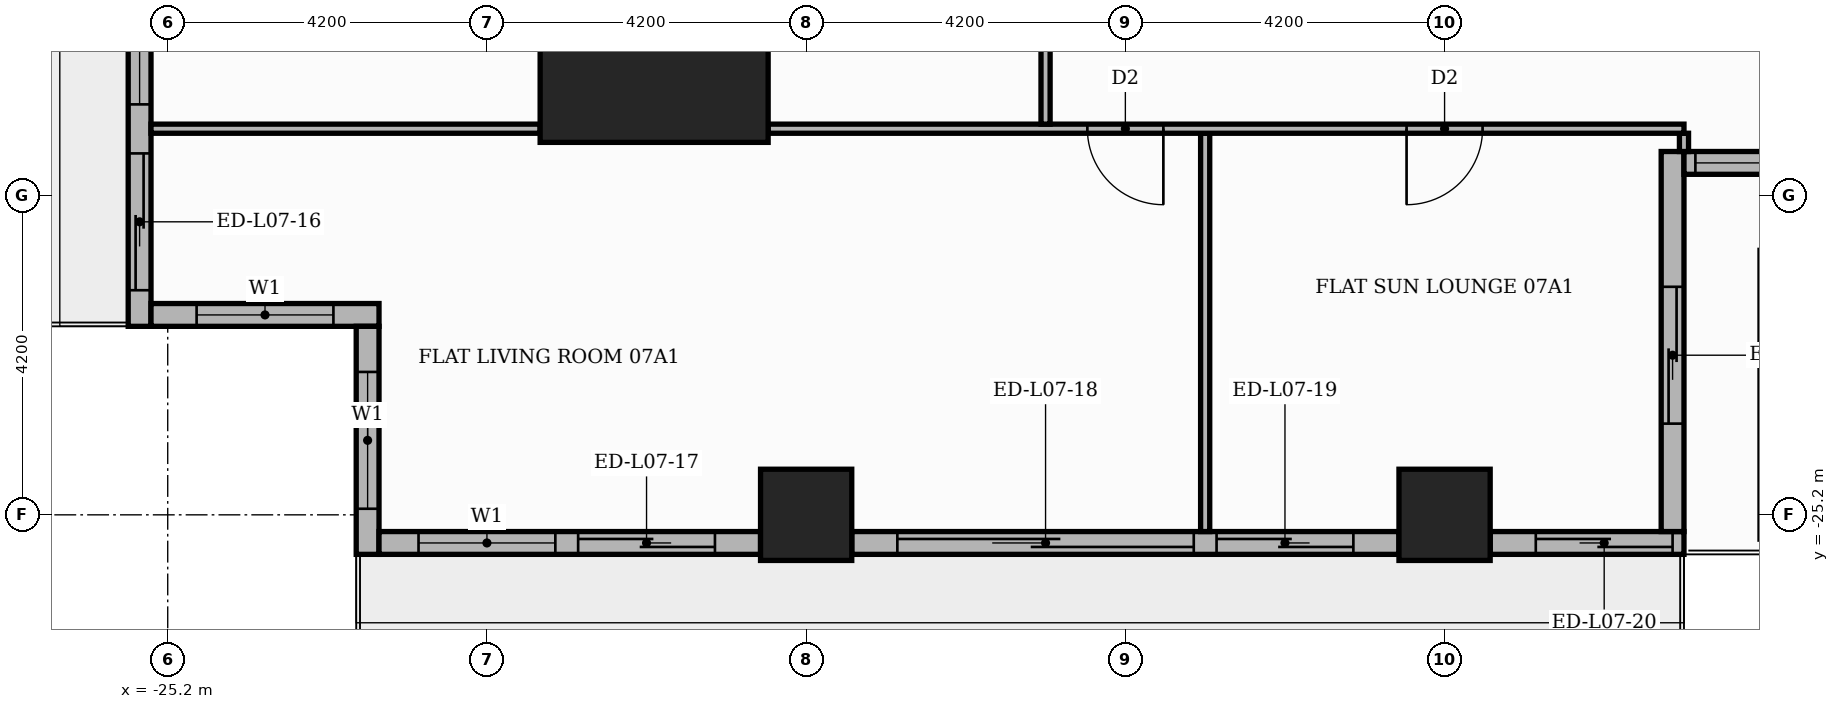
"""IFC4 building model, lengths in metres.
Left out: names, types, materials, properties, quantities, classifications, styles, units other than length and angle.
Written with IfcOpenShell. Run it as: python <this file> out.ifc"""

import sys

from ifc_helpers import new_model, si_unit, direction, frame, frame_2d, origin, origin_2d, place, context, subcontext, project, spatial, rectangle, extrude, element, fill, save


model = new_model("IFC4")
c1 = context("Model", 3, precision=1e-05, world=origin(), true_north=direction((0.0, 1.0)))
c2 = subcontext(c1, "Body", "Model", "MODEL_VIEW")
j1 = project(units=[si_unit("LENGTHUNIT", "METRE"), si_unit("PLANEANGLEUNIT", "RADIAN")], contexts=[c1])
p1 = place(None, origin())
s1 = spatial("IfcSite", under=j1, at=p1, CompositionType="ELEMENT")
p2 = place(p1, origin())
s2 = spatial("IfcBuilding", under=s1, at=p2, CompositionType="ELEMENT")
p3 = place(p2, frame((0.0, 0.0, 34.8)))
s3 = spatial("IfcBuildingStorey", under=s2, at=p3, CompositionType="ELEMENT", Elevation=34.8)
p4 = place(p3, frame((-18.8, -18.8, 0.0), z_axis=(0.0, 0.0, 1.0), x_axis=(1.0, 0.0, 0.0)))
e1 = element("IfcColumn", 1, at=p4, inside=s3, PredefinedType="COLUMN", context=c2, shape_type="SweptSolid", body=[
    extrude(rectangle(XDim=3.0, YDim=3.0, at=origin_2d()), origin(), (0.0, 0.0, 1.0), 3.9),
])
for number, where, z_axis, x_axis in (
    (2, (-8.4, -25.2, 0.0), (0.0, 0.0, 1.0), (1.0, 0.0, 0.0)),
    (3, (-16.8, -25.2, 0.0), (0.0, 0.0, 1.0), (1.0, 0.0, 0.0)),
):
    element("IfcColumn", number, at=place(p3, frame(where, z_axis=z_axis, x_axis=x_axis)), inside=s3, PredefinedType="COLUMN", context=c2, shape_type="SweptSolid", body=[
        extrude(rectangle(XDim=1.2, YDim=1.2, at=origin_2d()), origin(), (0.0, 0.0, 1.0), 3.9),
    ])
p5 = place(p3, frame((-25.57, -17.4, 0.0), z_axis=(0.0, 0.0, 1.0), x_axis=(0.0, -1.0, 0.0)))
e4 = element("IfcWall", 4, at=p5, inside=s3, PredefinedType="STANDARD", context=c2, shape_type="SweptSolid", body=[
    extrude(rectangle(XDim=5.32, YDim=0.3, at=frame_2d((2.66, 0.0))), origin(), (0.0, 0.0, 1.0), 3.48),
])
p6 = place(p5, frame((0.6, 0.0, 0.9)))
e5 = element("IfcOpeningElement", 5, at=p6, cuts=e4, PredefinedType="OPENING", context=c2, shape_type="SweptSolid", body=[
    extrude(rectangle(XDim=1.8, YDim=2.1, at=frame_2d((0.9, 1.05))), frame((0.0, 0.16, 0.0), z_axis=(0.0, -1.0, 0.0), x_axis=(1.0, 0.0, 0.0)), (0.0, 0.0, 1.0), 0.32),
])
p7 = place(p5, frame((3.045, 0.0, 0.0)))
e6 = element("IfcOpeningElement", 6, at=p7, cuts=e4, PredefinedType="OPENING", context=c2, shape_type="SweptSolid", body=[
    extrude(rectangle(XDim=1.8, YDim=2.4, at=frame_2d((0.9, 1.2))), frame((0.0, 0.16, 0.0), z_axis=(0.0, -1.0, 0.0), x_axis=(1.0, 0.0, 0.0)), (0.0, 0.0, 1.0), 0.32),
])
p8 = place(p3, frame((-25.42, -22.57, 0.0), z_axis=(0.0, 0.0, 1.0), x_axis=(1.0, 0.0, 0.0)))
e7 = element("IfcWall", 7, at=p8, inside=s3, PredefinedType="STANDARD", context=c2, shape_type="SweptSolid", body=[
    extrude(rectangle(XDim=3.0, YDim=0.3, at=frame_2d((1.5, 0.0))), origin(), (0.0, 0.0, 1.0), 3.48),
])
p9 = place(p8, frame((0.6, 0.0, 0.9)))
e8 = element("IfcOpeningElement", 8, at=p9, cuts=e7, PredefinedType="OPENING", context=c2, shape_type="SweptSolid", body=[
    extrude(rectangle(XDim=1.8, YDim=2.1, at=frame_2d((0.9, 1.05))), frame((0.0, 0.16, 0.0), z_axis=(0.0, -1.0, 0.0), x_axis=(1.0, 0.0, 0.0)), (0.0, 0.0, 1.0), 0.32),
])
p10 = place(p3, frame((-22.57, -22.72, 0.0), z_axis=(0.0, 0.0, 1.0), x_axis=(0.0, -1.0, 0.0)))
e9 = element("IfcWall", 9, at=p10, inside=s3, PredefinedType="STANDARD", context=c2, shape_type="SweptSolid", body=[
    extrude(rectangle(XDim=3.0, YDim=0.3, at=frame_2d((1.5, 0.0))), origin(), (0.0, 0.0, 1.0), 3.48),
])
p11 = place(p10, frame((0.6, 0.0, 0.9)))
e10 = element("IfcOpeningElement", 10, at=p11, cuts=e9, PredefinedType="OPENING", context=c2, shape_type="SweptSolid", body=[
    extrude(rectangle(XDim=1.8, YDim=2.1, at=frame_2d((0.9, 1.05))), frame((0.0, 0.16, 0.0), z_axis=(0.0, -1.0, 0.0), x_axis=(1.0, 0.0, 0.0)), (0.0, 0.0, 1.0), 0.32),
])
p12 = place(p3, frame((-22.42, -25.57, 0.0), z_axis=(0.0, 0.0, 1.0), x_axis=(1.0, 0.0, 0.0)))
e11 = element("IfcWall", 11, at=p12, inside=s3, PredefinedType="STANDARD", context=c2, shape_type="SweptSolid", body=[
    extrude(rectangle(XDim=5.02, YDim=0.3, at=frame_2d((2.51, 0.0))), origin(), (0.0, 0.0, 1.0), 3.48),
])
p13 = place(p12, frame((0.52, 0.0, 0.9)))
e12 = element("IfcOpeningElement", 12, at=p13, cuts=e11, PredefinedType="OPENING", context=c2, shape_type="SweptSolid", body=[
    extrude(rectangle(XDim=1.8, YDim=2.1, at=frame_2d((0.9, 1.05))), frame((0.0, 0.16, 0.0), z_axis=(0.0, -1.0, 0.0), x_axis=(1.0, 0.0, 0.0)), (0.0, 0.0, 1.0), 0.32),
])
p14 = place(p12, frame((2.62, 0.0, 0.0)))
e13 = element("IfcOpeningElement", 13, at=p14, cuts=e11, PredefinedType="OPENING", context=c2, shape_type="SweptSolid", body=[
    extrude(rectangle(XDim=1.8, YDim=2.4, at=frame_2d((0.9, 1.2))), frame((0.0, 0.16, 0.0), z_axis=(0.0, -1.0, 0.0), x_axis=(1.0, 0.0, 0.0)), (0.0, 0.0, 1.0), 0.32),
])
p15 = place(p3, frame((-16.2, -25.57, 0.0), z_axis=(0.0, 0.0, 1.0), x_axis=(1.0, 0.0, 0.0)))
e14 = element("IfcWall", 14, at=p15, inside=s3, PredefinedType="STANDARD", context=c2, shape_type="SweptSolid", body=[
    extrude(rectangle(XDim=7.2, YDim=0.3, at=frame_2d((3.6, 0.0))), origin(), (0.0, 0.0, 1.0), 3.48),
])
p16 = place(p15, frame((0.6, 0.0, 0.0)))
e15 = element("IfcOpeningElement", 15, at=p16, cuts=e14, PredefinedType="OPENING", context=c2, shape_type="SweptSolid", body=[
    extrude(rectangle(XDim=3.9, YDim=2.4, at=frame_2d((1.95, 1.2))), frame((0.0, 0.16, 0.0), z_axis=(0.0, -1.0, 0.0), x_axis=(1.0, 0.0, 0.0)), (0.0, 0.0, 1.0), 0.32),
])
p17 = place(p15, frame((4.8, 0.0, 0.0)))
e16 = element("IfcOpeningElement", 16, at=p17, cuts=e14, PredefinedType="OPENING", context=c2, shape_type="SweptSolid", body=[
    extrude(rectangle(XDim=1.8, YDim=2.4, at=frame_2d((0.9, 1.2))), frame((0.0, 0.16, 0.0), z_axis=(0.0, -1.0, 0.0), x_axis=(1.0, 0.0, 0.0)), (0.0, 0.0, 1.0), 0.32),
])
p18 = place(p3, frame((-7.8, -25.57, 0.0), z_axis=(0.0, 0.0, 1.0), x_axis=(1.0, 0.0, 0.0)))
e17 = element("IfcWall", 17, at=p18, inside=s3, PredefinedType="STANDARD", context=c2, shape_type="SweptSolid", body=[
    extrude(rectangle(XDim=2.55, YDim=0.3, at=frame_2d((1.275, 0.0))), origin(), (0.0, 0.0, 1.0), 3.48),
])
p19 = place(p18, frame((0.6, 0.0, 0.0)))
e18 = element("IfcOpeningElement", 18, at=p19, cuts=e17, PredefinedType="OPENING", context=c2, shape_type="SweptSolid", body=[
    extrude(rectangle(XDim=1.8, YDim=2.4, at=frame_2d((0.9, 1.2))), frame((0.0, 0.16, 0.0), z_axis=(0.0, -1.0, 0.0), x_axis=(1.0, 0.0, 0.0)), (0.0, 0.0, 1.0), 0.32),
])
p20 = place(p3, frame((-5.4, -25.42, 0.0), z_axis=(0.0, 0.0, 1.0), x_axis=(0.0, 1.0, 0.0)))
e19 = element("IfcWall", 19, at=p20, inside=s3, PredefinedType="STANDARD", context=c2, shape_type="SweptSolid", body=[
    extrude(rectangle(XDim=5.0, YDim=0.3, at=frame_2d((2.5, 0.0))), origin(), (0.0, 0.0, 1.0), 3.48),
])
p21 = place(p20, frame((1.42, 0.0, 0.0)))
e20 = element("IfcOpeningElement", 20, at=p21, cuts=e19, PredefinedType="OPENING", context=c2, shape_type="SweptSolid", body=[
    extrude(rectangle(XDim=1.8, YDim=2.4, at=frame_2d((0.9, 1.2))), frame((0.0, 0.16, 0.0), z_axis=(0.0, -1.0, 0.0), x_axis=(1.0, 0.0, 0.0)), (0.0, 0.0, 1.0), 0.32),
])
p22 = place(p3, frame((-5.25, -20.57, 0.0), z_axis=(0.0, 0.0, 1.0), x_axis=(1.0, 0.0, 0.0)))
e21 = element("IfcWall", 21, at=p22, inside=s3, PredefinedType="STANDARD", context=c2, shape_type="SweptSolid", body=[
    extrude(rectangle(XDim=10.8, YDim=0.3, at=frame_2d((5.4, 0.0))), origin(), (0.0, 0.0, 1.0), 3.48),
])
p23 = place(p22, frame((0.15, 0.0, 0.9)))
e22 = element("IfcOpeningElement", 22, at=p23, cuts=e21, PredefinedType="OPENING", context=c2, shape_type="SweptSolid", body=[
    extrude(rectangle(XDim=6.0, YDim=2.1, at=frame_2d((3.0, 1.05))), frame((0.0, 0.16, 0.0), z_axis=(0.0, -1.0, 0.0), x_axis=(1.0, 0.0, 0.0)), (0.0, 0.0, 1.0), 0.32),
])
p24 = place(p22, frame((6.45, 0.0, 0.9)))
e23 = element("IfcOpeningElement", 23, at=p24, cuts=e21, PredefinedType="OPENING", context=c2, shape_type="SweptSolid", body=[
    extrude(rectangle(XDim=3.9, YDim=2.1, at=frame_2d((1.95, 1.05))), frame((0.0, 0.16, 0.0), z_axis=(0.0, -1.0, 0.0), x_axis=(1.0, 0.0, 0.0)), (0.0, 0.0, 1.0), 0.32),
])
p25 = place(p3, frame((-11.55, -25.42, 0.0), z_axis=(0.0, 0.0, 1.0), x_axis=(0.0, 1.0, 0.0)))
e24 = element("IfcWall", 24, at=p25, inside=s3, PredefinedType="PARTITIONING", context=c2, shape_type="SweptSolid", body=[
    extrude(rectangle(XDim=5.24, YDim=0.12, at=frame_2d((2.62, 0.0))), origin(), (0.0, 0.0, 1.0), 3.48),
])
p26 = place(p3, frame((-5.25, -20.42, 0.0), z_axis=(0.0, 0.0, 1.0), x_axis=(0.0, 1.0, 0.0)))
e25 = element("IfcWall", 25, at=p26, inside=s3, PredefinedType="PARTITIONING", context=c2, shape_type="SweptSolid", body=[
    extrude(rectangle(XDim=0.24, YDim=0.12, at=frame_2d((0.12, 0.0))), origin(), (0.0, 0.0, 1.0), 3.48),
])
p27 = place(p3, frame((-25.42, -20.12, 0.0), z_axis=(0.0, 0.0, 1.0), x_axis=(1.0, 0.0, 0.0)))
e26 = element("IfcWall", 26, at=p27, inside=s3, PredefinedType="PARTITIONING", context=c2, shape_type="SweptSolid", body=[
    extrude(rectangle(XDim=5.12, YDim=0.12, at=frame_2d((2.56, 0.0))), origin(), (0.0, 0.0, 1.0), 3.48),
])
p28 = place(p3, frame((-17.3, -20.12, 0.0), z_axis=(0.0, 0.0, 1.0), x_axis=(1.0, 0.0, 0.0)))
e27 = element("IfcWall", 27, at=p28, inside=s3, PredefinedType="PARTITIONING", context=c2, shape_type="SweptSolid", body=[
    extrude(rectangle(XDim=12.05, YDim=0.12, at=frame_2d((6.025, 0.0))), origin(), (0.0, 0.0, 1.0), 3.48),
])
p29 = place(p28, frame((4.2, 0.0, 0.0)))
e28 = element("IfcOpeningElement", 28, at=p29, cuts=e27, PredefinedType="OPENING", context=c2, shape_type="SweptSolid", body=[
    extrude(rectangle(XDim=1.0, YDim=2.1, at=frame_2d((0.5, 1.05))), frame((0.0, 0.07, 0.0), z_axis=(0.0, -1.0, 0.0), x_axis=(1.0, 0.0, 0.0)), (0.0, 0.0, 1.0), 0.14),
])
p30 = place(p28, frame((8.4, 0.0, 0.0)))
e29 = element("IfcOpeningElement", 29, at=p30, cuts=e27, PredefinedType="OPENING", context=c2, shape_type="SweptSolid", body=[
    extrude(rectangle(XDim=1.0, YDim=2.1, at=frame_2d((0.5, 1.05))), frame((0.0, 0.07, 0.0), z_axis=(0.0, -1.0, 0.0), x_axis=(1.0, 0.0, 0.0)), (0.0, 0.0, 1.0), 0.14),
])
p31 = place(p3, frame((-13.65, -20.06, 0.0), z_axis=(0.0, 0.0, 1.0), x_axis=(0.0, 1.0, 0.0)))
e30 = element("IfcWall", 30, at=p31, inside=s3, PredefinedType="PARTITIONING", context=c2, shape_type="SweptSolid", body=[
    extrude(rectangle(XDim=6.31, YDim=0.12, at=frame_2d((3.155, 0.0))), origin(), (0.0, 0.0, 1.0), 3.48),
])
p32 = place(p31, frame((2.675, 0.0, 0.0)))
e31 = element("IfcOpeningElement", 31, at=p32, cuts=e30, PredefinedType="OPENING", context=c2, shape_type="SweptSolid", body=[
    extrude(rectangle(XDim=1.0, YDim=2.1, at=frame_2d((0.5, 1.05))), frame((0.0, 0.07, 0.0), z_axis=(0.0, -1.0, 0.0), x_axis=(1.0, 0.0, 0.0)), (0.0, 0.0, 1.0), 0.14),
])
p33 = place(p6, origin())
e32 = element("IfcWindow", 32, at=p33, inside=s3, PartitioningType="SINGLE_PANEL", PredefinedType="WINDOW", context=c2, shape_type="SweptSolid", body=[
    extrude(rectangle(XDim=1.8, YDim=2.1, at=frame_2d((0.9, 1.05))), frame((0.0, 0.03, 0.0), z_axis=(0.0, -1.0, 0.0), x_axis=(1.0, 0.0, 0.0)), (0.0, 0.0, 1.0), 0.06),
])
fill(e5, e32)
p34 = place(p7, origin())
e33 = element("IfcDoor", 33, at=p34, inside=s3, OperationType="SLIDING_TO_RIGHT", PredefinedType="DOOR", context=c2, shape_type="SweptSolid", body=[
    extrude(rectangle(XDim=1.8, YDim=2.4, at=frame_2d((0.9, 1.2))), frame((0.0, 0.025, 0.0), z_axis=(0.0, -1.0, 0.0), x_axis=(1.0, 0.0, 0.0)), (0.0, 0.0, 1.0), 0.05),
])
fill(e6, e33)
p35 = place(p9, origin())
e34 = element("IfcWindow", 34, at=p35, inside=s3, PartitioningType="SINGLE_PANEL", PredefinedType="WINDOW", context=c2, shape_type="SweptSolid", body=[
    extrude(rectangle(XDim=1.8, YDim=2.1, at=frame_2d((0.9, 1.05))), frame((0.0, 0.03, 0.0), z_axis=(0.0, -1.0, 0.0), x_axis=(1.0, 0.0, 0.0)), (0.0, 0.0, 1.0), 0.06),
])
fill(e8, e34)
p36 = place(p11, origin())
e35 = element("IfcWindow", 35, at=p36, inside=s3, PartitioningType="SINGLE_PANEL", PredefinedType="WINDOW", context=c2, shape_type="SweptSolid", body=[
    extrude(rectangle(XDim=1.8, YDim=2.1, at=frame_2d((0.9, 1.05))), frame((0.0, 0.03, 0.0), z_axis=(0.0, -1.0, 0.0), x_axis=(1.0, 0.0, 0.0)), (0.0, 0.0, 1.0), 0.06),
])
fill(e10, e35)
p37 = place(p13, origin())
e36 = element("IfcWindow", 36, at=p37, inside=s3, PartitioningType="SINGLE_PANEL", PredefinedType="WINDOW", context=c2, shape_type="SweptSolid", body=[
    extrude(rectangle(XDim=1.8, YDim=2.1, at=frame_2d((0.9, 1.05))), frame((0.0, 0.03, 0.0), z_axis=(0.0, -1.0, 0.0), x_axis=(1.0, 0.0, 0.0)), (0.0, 0.0, 1.0), 0.06),
])
fill(e12, e36)
p38 = place(p14, origin())
e37 = element("IfcDoor", 37, at=p38, inside=s3, OperationType="SLIDING_TO_RIGHT", PredefinedType="DOOR", context=c2, shape_type="SweptSolid", body=[
    extrude(rectangle(XDim=1.8, YDim=2.4, at=frame_2d((0.9, 1.2))), frame((0.0, 0.025, 0.0), z_axis=(0.0, -1.0, 0.0), x_axis=(1.0, 0.0, 0.0)), (0.0, 0.0, 1.0), 0.05),
])
fill(e13, e37)
p39 = place(p16, origin())
e38 = element("IfcDoor", 38, at=p39, inside=s3, OperationType="SLIDING_TO_LEFT", PredefinedType="DOOR", context=c2, shape_type="SweptSolid", body=[
    extrude(rectangle(XDim=3.9, YDim=2.4, at=frame_2d((1.95, 1.2))), frame((0.0, 0.025, 0.0), z_axis=(0.0, -1.0, 0.0), x_axis=(1.0, 0.0, 0.0)), (0.0, 0.0, 1.0), 0.05),
])
fill(e15, e38)
p40 = place(p17, origin())
e39 = element("IfcDoor", 39, at=p40, inside=s3, OperationType="SLIDING_TO_RIGHT", PredefinedType="DOOR", context=c2, shape_type="SweptSolid", body=[
    extrude(rectangle(XDim=1.8, YDim=2.4, at=frame_2d((0.9, 1.2))), frame((0.0, 0.025, 0.0), z_axis=(0.0, -1.0, 0.0), x_axis=(1.0, 0.0, 0.0)), (0.0, 0.0, 1.0), 0.05),
])
fill(e16, e39)
p41 = place(p19, origin())
e40 = element("IfcDoor", 40, at=p41, inside=s3, OperationType="SLIDING_TO_LEFT", PredefinedType="DOOR", context=c2, shape_type="SweptSolid", body=[
    extrude(rectangle(XDim=1.8, YDim=2.4, at=frame_2d((0.9, 1.2))), frame((0.0, 0.025, 0.0), z_axis=(0.0, -1.0, 0.0), x_axis=(1.0, 0.0, 0.0)), (0.0, 0.0, 1.0), 0.05),
])
fill(e18, e40)
p42 = place(p21, origin())
e41 = element("IfcDoor", 41, at=p42, inside=s3, OperationType="SLIDING_TO_LEFT", PredefinedType="DOOR", context=c2, shape_type="SweptSolid", body=[
    extrude(rectangle(XDim=1.8, YDim=2.4, at=frame_2d((0.9, 1.2))), frame((0.0, 0.025, 0.0), z_axis=(0.0, -1.0, 0.0), x_axis=(1.0, 0.0, 0.0)), (0.0, 0.0, 1.0), 0.05),
])
fill(e20, e41)
p43 = place(p23, origin())
e42 = element("IfcWindow", 42, at=p43, inside=s3, PartitioningType="SINGLE_PANEL", PredefinedType="WINDOW", context=c2, shape_type="SweptSolid", body=[
    extrude(rectangle(XDim=6.0, YDim=2.1, at=frame_2d((3.0, 1.05))), frame((0.0, 0.03, 0.0), z_axis=(0.0, -1.0, 0.0), x_axis=(1.0, 0.0, 0.0)), (0.0, 0.0, 1.0), 0.06),
])
fill(e22, e42)
p44 = place(p29, frame((1.0, 0.0, 0.0), z_axis=(0.0, 0.0, 1.0), x_axis=(-1.0, 0.0, 0.0)))
e43 = element("IfcDoor", 43, at=p44, inside=s3, OperationType="SINGLE_SWING_RIGHT", PredefinedType="DOOR", context=c2, shape_type="SweptSolid", body=[
    extrude(rectangle(XDim=1.0, YDim=2.1, at=frame_2d((0.5, 1.05))), frame((0.0, 0.025, 0.0), z_axis=(0.0, -1.0, 0.0), x_axis=(1.0, 0.0, 0.0)), (0.0, 0.0, 1.0), 0.05),
])
fill(e28, e43)
p45 = place(p30, frame((1.0, 0.0, 0.0), z_axis=(0.0, 0.0, 1.0), x_axis=(-1.0, 0.0, 0.0)))
e44 = element("IfcDoor", 44, at=p45, inside=s3, OperationType="SINGLE_SWING_LEFT", PredefinedType="DOOR", context=c2, shape_type="SweptSolid", body=[
    extrude(rectangle(XDim=1.0, YDim=2.1, at=frame_2d((0.5, 1.05))), frame((0.0, 0.025, 0.0), z_axis=(0.0, -1.0, 0.0), x_axis=(1.0, 0.0, 0.0)), (0.0, 0.0, 1.0), 0.05),
])
fill(e29, e44)
save(model, sys.argv[1])
